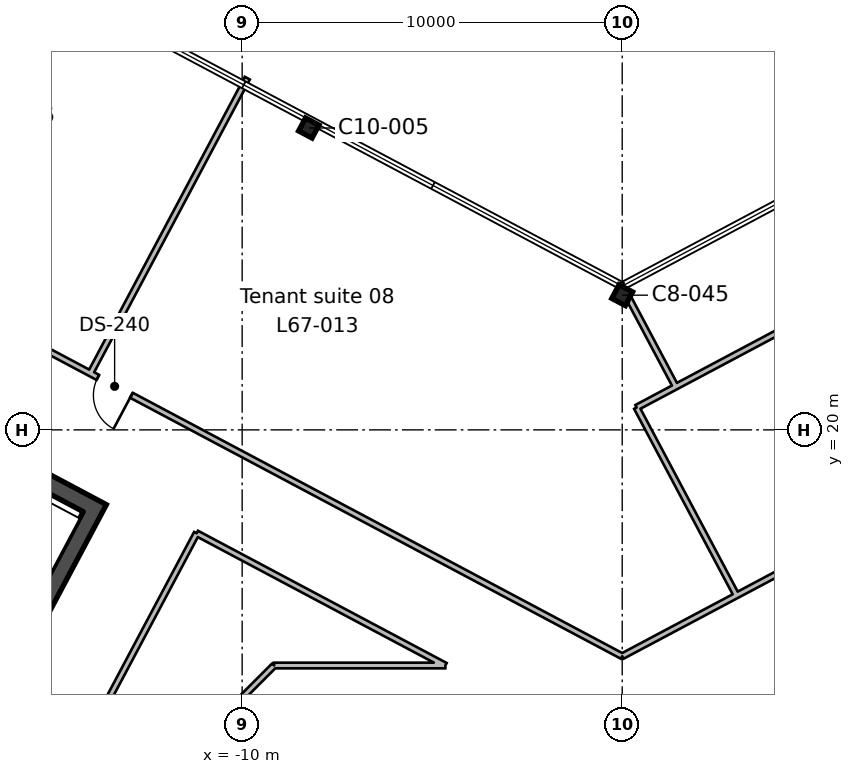
"""IFC4 building model, lengths in metres.
Left out: names, types, materials, properties, quantities, classifications, styles, units other than length and angle.
Written with IfcOpenShell. Run it as: python <this file> out.ifc"""

import sys

from ifc_helpers import new_model, si_unit, direction, frame, frame_2d, origin, origin_2d, place, context, subcontext, project, spatial, rectangle, i_section, extrude, element, fill, save


model = new_model("IFC4")
c1 = context("Model", 3, precision=1e-05, world=origin(), true_north=direction((0.0, 1.0)))
c2 = subcontext(c1, "Body", "Model", "MODEL_VIEW")
j1 = project(units=[si_unit("LENGTHUNIT", "METRE"), si_unit("PLANEANGLEUNIT", "RADIAN")], contexts=[c1])
p1 = place(None, origin())
s1 = spatial("IfcSite", under=j1, at=p1, CompositionType="ELEMENT")
p2 = place(p1, origin())
s2 = spatial("IfcBuilding", under=s1, at=p2, CompositionType="ELEMENT")
p3 = place(p2, frame((0.0, 0.0, 297.0)))
s3 = spatial("IfcBuildingStorey", under=s2, at=p3, CompositionType="ELEMENT", Elevation=297.0)
p4 = place(p3, frame((0.0, 23.544, 0.0), z_axis=(0.0, 0.0, 1.0), x_axis=(-0.882947592859, 0.469471562786, 0.0)))
e1 = element("IfcColumn", 1, at=p4, inside=s3, PredefinedType="COLUMN", context=c2, shape_type="SweptSolid", body=[
    extrude(i_section(OverallWidth=0.404, OverallDepth=0.406, WebThickness=0.027, FlangeThickness=0.044, FilletRadius=0.015, at=origin_2d()), origin(), (0.0, 0.0, 1.0), 3.9),
])
p5 = place(p3, frame((-8.247, 27.943, 0.0), z_axis=(0.0, 0.0, 1.0), x_axis=(-0.882947592859, 0.469471562786, 0.0)))
e2 = element("IfcColumn", 2, at=p5, inside=s3, PredefinedType="COLUMN", context=c2, shape_type="SweptSolid", body=[
    extrude(i_section(OverallWidth=0.399, OverallDepth=0.386, WebThickness=0.021, FlangeThickness=0.033, FilletRadius=0.015, at=origin_2d()), origin(), (0.0, 0.0, 1.0), 3.9),
])
p6 = place(p3, frame((-13.771, 18.138, 0.0), z_axis=(0.0, 0.0, 1.0), x_axis=(-0.469467968382, -0.882949504028, 0.0)))
e3 = element("IfcWall", 3, at=p6, inside=s3, PredefinedType="SHEAR", context=c2, shape_type="SweptSolid", body=[
    extrude(rectangle(XDim=19.1, YDim=0.45, at=frame_2d((9.55, 0.0))), origin(), (0.0, 0.0, 1.0), 3.9),
])
p7 = place(p6, frame((6.55, 0.0, 0.0)))
e4 = element("IfcOpeningElement", 4, at=p7, cuts=e3, PredefinedType="OPENING", context=c2, shape_type="SweptSolid", body=[
    extrude(rectangle(XDim=2.4, YDim=2.4, at=frame_2d((1.2, 1.2))), frame((0.0, 0.235, 0.0), z_axis=(0.0, -1.0, 0.0), x_axis=(1.0, 0.0, 0.0)), (0.0, 0.0, 1.0), 0.47),
])
p8 = place(p3, frame((-14.076, 18.045, 0.0), z_axis=(0.0, 0.0, 1.0), x_axis=(-0.882947755831, 0.46947125628, 0.0)))
e5 = element("IfcWall", 5, at=p8, inside=s3, PredefinedType="SHEAR", context=c2, shape_type="SweptSolid", body=[
    extrude(rectangle(XDim=20.2, YDim=0.45, at=frame_2d((10.1, 0.0))), origin(), (0.0, 0.0, 1.0), 3.9),
])
p9 = place(p3, frame((-48.541, 39.854, 0.0), z_axis=(0.0, 0.0, 1.0), x_axis=(0.882945008423, -0.469476423372, 0.0)))
e6 = element("IfcWall", 6, at=p9, inside=s3, PredefinedType="PARTITIONING", context=c2, shape_type="SweptSolid", body=[
    extrude(rectangle(XDim=54.976, YDim=0.15, at=frame_2d((27.488, 0.0))), origin(), (0.0, 0.0, 1.0), 3.54),
])
p10 = place(p9, frame((39.35, 0.0, 0.0)))
e7 = element("IfcOpeningElement", 7, at=p10, cuts=e6, PredefinedType="OPENING", context=c2, shape_type="SweptSolid", body=[
    extrude(rectangle(XDim=1.0, YDim=2.1, at=frame_2d((0.5, 1.05))), frame((0.0, 0.085, 0.0), z_axis=(0.0, -1.0, 0.0), x_axis=(1.0, 0.0, 0.0)), (0.0, 0.0, 1.0), 0.17),
])
p11 = place(p9, frame((26.95, 0.0, 0.0)))
e8 = element("IfcOpeningElement", 8, at=p11, cuts=e6, PredefinedType="OPENING", context=c2, shape_type="SweptSolid", body=[
    extrude(rectangle(XDim=1.0, YDim=2.1, at=frame_2d((0.5, 1.05))), frame((0.0, 0.085, 0.0), z_axis=(0.0, -1.0, 0.0), x_axis=(1.0, 0.0, 0.0)), (0.0, 0.0, 1.0), 0.17),
])
p12 = place(p9, frame((21.049, 0.0, 0.0)))
e9 = element("IfcOpeningElement", 9, at=p12, cuts=e6, PredefinedType="OPENING", context=c2, shape_type="SweptSolid", body=[
    extrude(rectangle(XDim=1.0, YDim=2.1, at=frame_2d((0.5, 1.05))), frame((0.0, 0.085, 0.0), z_axis=(0.0, -1.0, 0.0), x_axis=(1.0, 0.0, 0.0)), (0.0, 0.0, 1.0), 0.17),
])
p13 = place(p9, frame((15.35, 0.0, 0.0)))
e10 = element("IfcOpeningElement", 10, at=p13, cuts=e6, PredefinedType="OPENING", context=c2, shape_type="SweptSolid", body=[
    extrude(rectangle(XDim=1.0, YDim=2.1, at=frame_2d((0.5, 1.05))), frame((0.0, 0.085, 0.0), z_axis=(0.0, -1.0, 0.0), x_axis=(1.0, 0.0, 0.0)), (0.0, 0.0, 1.0), 0.17),
])
p14 = place(p3, frame((0.0, 14.044, 0.0), z_axis=(0.0, 0.0, 1.0), x_axis=(0.882952097871, 0.469463089992, 0.0)))
e11 = element("IfcWall", 11, at=p14, inside=s3, PredefinedType="PARTITIONING", context=c2, shape_type="SweptSolid", body=[
    extrude(rectangle(XDim=33.607, YDim=0.15, at=frame_2d((16.803, 0.0))), origin(), (0.0, 0.0, 1.0), 3.54),
])
p15 = place(p14, frame((15.95, 0.0, 0.0)))
e12 = element("IfcOpeningElement", 12, at=p15, cuts=e11, PredefinedType="OPENING", context=c2, shape_type="SweptSolid", body=[
    extrude(rectangle(XDim=1.8, YDim=2.1, at=frame_2d((0.9, 1.05))), frame((0.0, 0.085, 0.0), z_axis=(0.0, -1.0, 0.0), x_axis=(1.0, 0.0, 0.0)), (0.0, 0.0, 1.0), 0.17),
])
p16 = place(p3, frame((-9.864, 29.255, 0.0), z_axis=(0.0, 0.0, 1.0), x_axis=(-0.469457446168, -0.882955098653, 0.0)))
e13 = element("IfcWall", 13, at=p16, inside=s3, PredefinedType="PARTITIONING", context=c2, shape_type="SweptSolid", body=[
    extrude(rectangle(XDim=8.8, YDim=0.15, at=frame_2d((4.4, 0.0))), origin(), (0.0, 0.0, 1.0), 3.54),
])
p17 = place(p3, frame((2.38, 16.825, 0.0), z_axis=(0.0, 0.0, 1.0), x_axis=(0.469328592165, -0.88302359684, 0.0)))
e14 = element("IfcWall", 14, at=p17, inside=s3, PredefinedType="PARTITIONING", context=c2, shape_type="SweptSolid", body=[
    extrude(rectangle(XDim=1.338, YDim=0.15, at=frame_2d((0.669, 0.0))), origin(), (0.0, 0.0, 1.0), 3.54),
])
p18 = place(p3, frame((0.178, 23.45, 0.0), z_axis=(0.0, 0.0, 1.0), x_axis=(0.469495603372, -0.882934809833, 0.0)))
e15 = element("IfcWall", 15, at=p18, inside=s3, PredefinedType="PARTITIONING", context=c2, shape_type="SweptSolid", body=[
    extrude(rectangle(XDim=2.622, YDim=0.15, at=frame_2d((1.311, 0.0))), origin(), (0.0, 0.0, 1.0), 3.54),
])
p19 = place(p3, frame((1.405, 21.133, 0.0), z_axis=(0.0, 0.0, 1.0), x_axis=(0.882934197132, 0.469496755618, 0.0)))
e16 = element("IfcWall", 16, at=p19, inside=s3, PredefinedType="PARTITIONING", context=c2, shape_type="SweptSolid", body=[
    extrude(rectangle(XDim=15.504, YDim=0.15, at=frame_2d((7.752, 0.0))), origin(), (0.0, 0.0, 1.0), 3.54),
])
p20 = place(p3, frame((2.38, 16.825, 0.0), z_axis=(0.0, 0.0, 1.0), x_axis=(-0.469505616232, 0.882929485478, 0.0)))
e17 = element("IfcWall", 17, at=p20, inside=s3, PredefinedType="PARTITIONING", context=c2, shape_type="SweptSolid", body=[
    extrude(rectangle(XDim=4.262, YDim=0.15, at=frame_2d((2.131, 0.0))), origin(), (0.0, 0.0, 1.0), 3.54),
])
p21 = place(p3, frame((1.405, 21.133, 0.0), z_axis=(0.0, 0.0, 1.0), x_axis=(-0.882753784089, -0.469835882704, 0.0)))
e18 = element("IfcWall", 18, at=p21, inside=s3, PredefinedType="PARTITIONING", context=c2, shape_type="SweptSolid", body=[
    extrude(rectangle(XDim=1.162, YDim=0.15, at=frame_2d((0.581, 0.0))), origin(), (0.0, 0.0, 1.0), 3.54),
])
p22 = place(p3, frame((-20.588, -0.379, 0.0), z_axis=(0.0, 0.0, 1.0), x_axis=(0.469489882812, 0.882937851685, 0.0)))
e19 = element("IfcWall", 19, at=p22, inside=s3, PredefinedType="PARTITIONING", context=c2, shape_type="SweptSolid", body=[
    extrude(rectangle(XDim=20.0, YDim=0.15, at=frame_2d((10.0, 0.0))), origin(), (0.0, 0.0, 1.0), 3.54),
])
p23 = place(p22, frame((9.55, 0.0, 0.0)))
e20 = element("IfcOpeningElement", 20, at=p23, cuts=e19, PredefinedType="OPENING", context=c2, shape_type="SweptSolid", body=[
    extrude(rectangle(XDim=1.0, YDim=2.1, at=frame_2d((0.5, 1.05))), frame((0.0, 0.085, 0.0), z_axis=(0.0, -1.0, 0.0), x_axis=(1.0, 0.0, 0.0)), (0.0, 0.0, 1.0), 0.17),
])
p24 = place(p3, frame((-11.198, 17.28, 0.0), z_axis=(0.0, 0.0, 1.0), x_axis=(0.88294849999, -0.469469856717, 0.0)))
e21 = element("IfcWall", 21, at=p24, inside=s3, PredefinedType="PARTITIONING", context=c2, shape_type="SweptSolid", body=[
    extrude(rectangle(XDim=7.413, YDim=0.15, at=frame_2d((3.706, 0.0))), origin(), (0.0, 0.0, 1.0), 3.54),
])
p25 = place(p3, frame((-4.653, 13.8, 0.0), z_axis=(0.0, 0.0, 1.0), x_axis=(-1.0, 0.0, 0.0)))
e22 = element("IfcWall", 22, at=p25, inside=s3, PredefinedType="PARTITIONING", context=c2, shape_type="SweptSolid", body=[
    extrude(rectangle(XDim=4.507, YDim=0.15, at=frame_2d((2.253, 0.0))), origin(), (0.0, 0.0, 1.0), 3.54),
])
p26 = place(p3, frame((-9.16, 13.8, 0.0), z_axis=(0.0, 0.0, 1.0), x_axis=(-0.707106781187, -0.707106781187, 0.0)))
e23 = element("IfcWall", 23, at=p26, inside=s3, PredefinedType="PARTITIONING", context=c2, shape_type="SweptSolid", body=[
    extrude(rectangle(XDim=6.562, YDim=0.15, at=frame_2d((3.281, 0.0))), origin(), (0.0, 0.0, 1.0), 3.54),
])
p27 = place(p10, frame((1.0, 0.0, 0.0), z_axis=(0.0, 0.0, 1.0), x_axis=(-1.0, 0.0, 0.0)))
e24 = element("IfcDoor", 24, at=p27, inside=s3, OperationType="SINGLE_SWING_LEFT", PredefinedType="DOOR", context=c2, shape_type="SweptSolid", body=[
    extrude(rectangle(XDim=1.0, YDim=2.1, at=frame_2d((0.5, 1.05))), frame((0.0, 0.025, 0.0), z_axis=(0.0, -1.0, 0.0), x_axis=(1.0, 0.0, 0.0)), (0.0, 0.0, 1.0), 0.05),
])
fill(e7, e24)
save(model, sys.argv[1])
